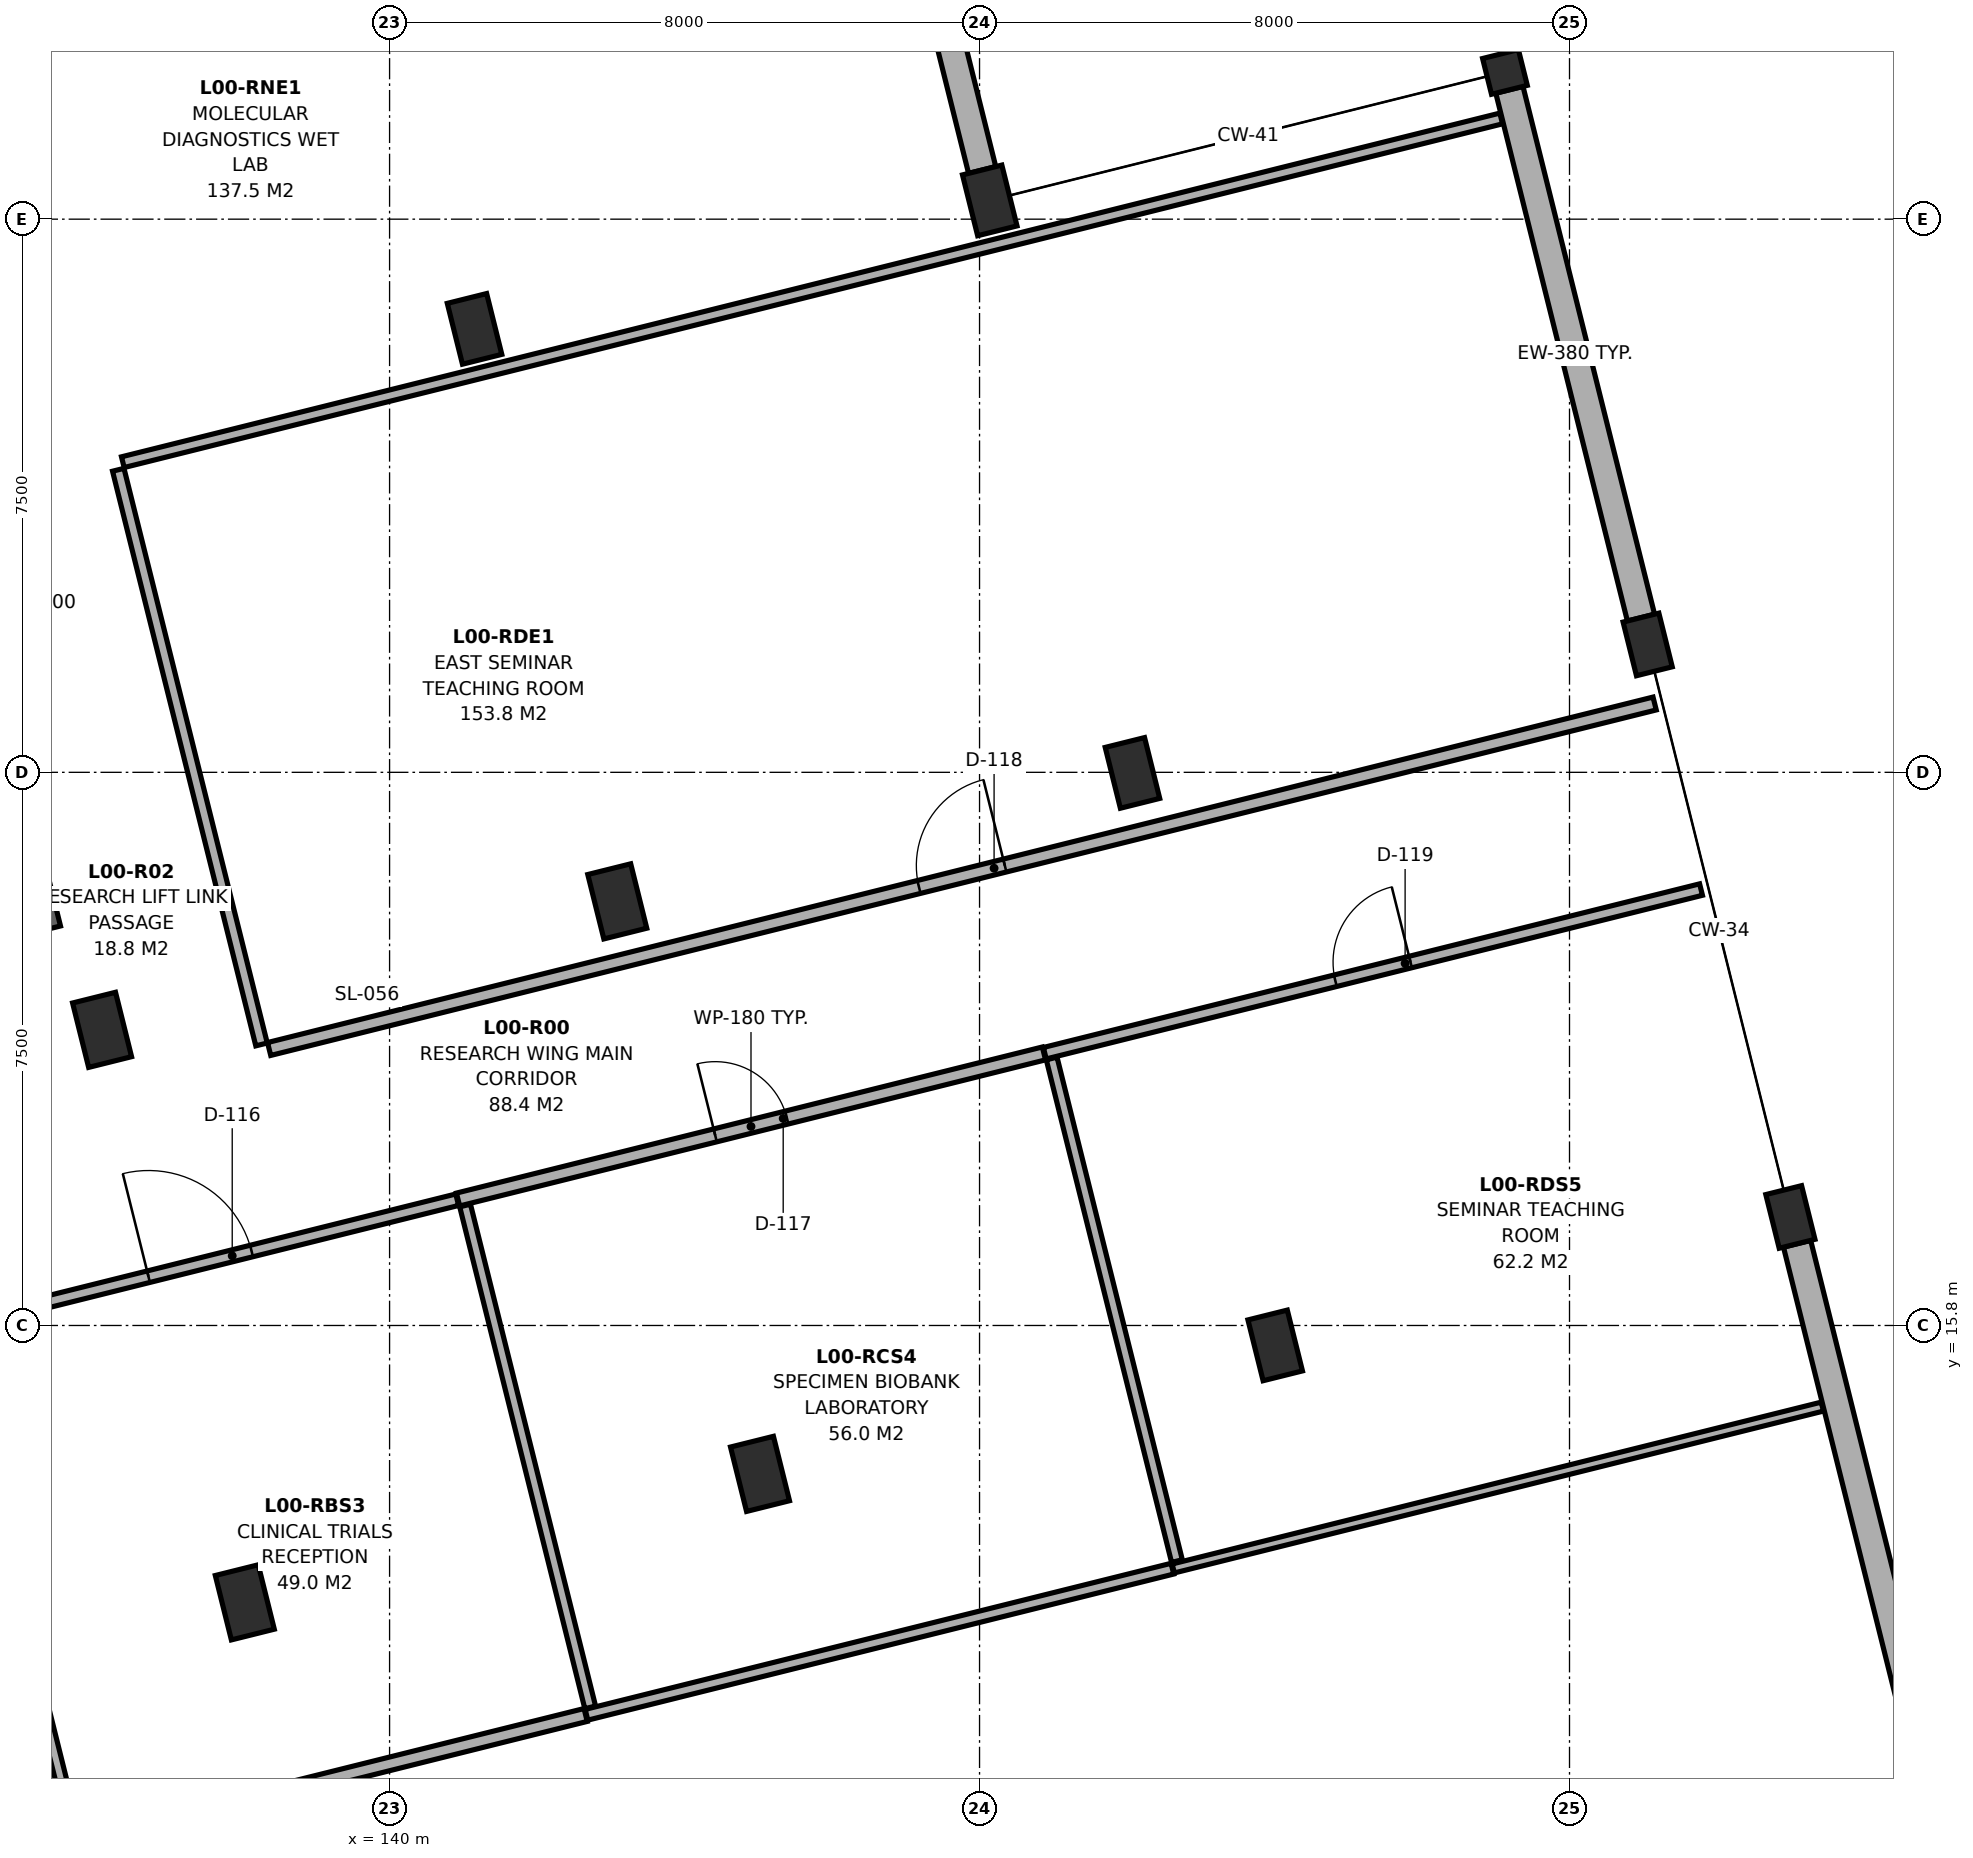
"""IFC4 building model, lengths in metres.
Left out: names, types, materials, properties, quantities, classifications, styles, units other than length and angle.
Written with IfcOpenShell. Run it as: python <this file> out.ifc"""

import sys

from ifc_helpers import new_model, si_unit, direction, frame, frame_2d, origin, origin_2d, place, context, subcontext, project, spatial, rectangle, extrude, element, fill, save


model = new_model("IFC4")
c1 = context("Model", 3, precision=1e-05, world=origin(), true_north=direction((0.0, 1.0)))
c2 = subcontext(c1, "Body", "Model", "MODEL_VIEW")
j1 = project(units=[si_unit("LENGTHUNIT", "METRE"), si_unit("PLANEANGLEUNIT", "RADIAN")], contexts=[c1])
p1 = place(None, origin())
s1 = spatial("IfcSite", under=j1, at=p1, CompositionType="ELEMENT")
p2 = place(p1, origin())
s2 = spatial("IfcBuilding", under=s1, at=p2, CompositionType="ELEMENT")
p3 = place(p2, origin())
s3 = spatial("IfcBuildingStorey", under=s2, at=p3, CompositionType="ELEMENT", Elevation=0.0)
for number, where, z_axis, x_axis in (
    (1, (138.037, 12.046, 0.0), (0.0, 0.0, 1.0), (0.97, 0.242, 0.0)),
    (2, (136.102, 19.808, 0.0), (0.0, 0.0, 1.0), (0.97, 0.242, 0.0)),
    (3, (145.023, 13.788, 0.0), (0.0, 0.0, 1.0), (0.97, 0.242, 0.0)),
    (4, (143.088, 21.55, 0.0), (0.0, 0.0, 1.0), (0.97, 0.242, 0.0)),
):
    element("IfcColumn", number, at=place(p3, frame(where, z_axis=z_axis, x_axis=x_axis)), inside=s3, PredefinedType="COLUMN", context=c2, shape_type="SweptSolid", body=[
        extrude(rectangle(XDim=0.6, YDim=0.9, at=origin_2d()), origin(), (0.0, 0.0, 1.0), 4.7),
    ])
for number, where, z_axis, x_axis in (
    (5, (141.152, 29.312, 0.0), (0.0, 0.0, 1.0), (0.97, 0.242, 0.0)),
    (6, (152.009, 15.53, 0.0), (0.0, 0.0, 1.0), (0.97, 0.242, 0.0)),
    (7, (150.074, 23.292, 0.0), (0.0, 0.0, 1.0), (0.97, 0.242, 0.0)),
    (8, (148.138, 31.054, 0.0), (0.0, 0.0, 1.0), (0.97, 0.242, 0.0)),
):
    element("IfcColumn", number, at=place(p3, frame(where, z_axis=z_axis, x_axis=x_axis)), inside=s3, PredefinedType="COLUMN", context=c2, shape_type="SweptSolid", body=[
        extrude(rectangle(XDim=0.55, YDim=0.85, at=origin_2d()), origin(), (0.0, 0.0, 1.0), 4.7),
    ])
for number, where, z_axis, x_axis in (
    (9, (158.995, 17.271, 0.0), (0.0, 0.0, 1.0), (0.97, 0.242, 0.0)),
    (10, (157.06, 25.034, 0.0), (0.0, 0.0, 1.0), (0.97, 0.242, 0.0)),
):
    element("IfcColumn", number, at=place(p3, frame(where, z_axis=z_axis, x_axis=x_axis)), inside=s3, PredefinedType="COLUMN", context=c2, shape_type="SweptSolid", body=[
        extrude(rectangle(XDim=0.5, YDim=0.75, at=origin_2d()), origin(), (0.0, 0.0, 1.0), 4.7),
    ])
p4 = place(p3, frame((155.125, 32.796, 0.0), z_axis=(0.0, 0.0, 1.0), x_axis=(0.970295726276, 0.2419218956, 0.0)))
e11 = element("IfcColumn", 11, at=p4, inside=s3, PredefinedType="COLUMN", context=c2, shape_type="SweptSolid", body=[
    extrude(rectangle(XDim=0.5, YDim=0.5, at=origin_2d()), origin(), (0.0, 0.0, 1.0), 6.096),
])
p5 = place(p3, frame((155.185, 32.554, 0.0), z_axis=(0.0, 0.0, 1.0), x_axis=(0.241920240952, -0.970296138825, 0.0)))
e12 = element("IfcWall", 12, at=p5, inside=s3, PredefinedType="SOLIDWALL", context=c2, shape_type="SweptSolid", body=[
    extrude(rectangle(XDim=7.375, YDim=0.38, at=frame_2d((3.688, 0.0))), origin(), (0.0, 0.0, 1.0), 3.985),
])
p6 = place(p3, frame((159.086, 16.908, 0.0), z_axis=(0.0, 0.0, 1.0), x_axis=(0.241917549853, -0.970296809782, 0.0)))
e13 = element("IfcWall", 13, at=p6, inside=s3, PredefinedType="SOLIDWALL", context=c2, shape_type="SweptSolid", body=[
    extrude(rectangle(XDim=7.25, YDim=0.38, at=frame_2d((3.625, 0.0))), origin(), (0.0, 0.0, 1.0), 3.985),
])
p7 = place(p3, frame((146.294, 38.453, 0.0), z_axis=(0.0, 0.0, 1.0), x_axis=(0.241937193493, -0.970291911955, 0.0)))
e14 = element("IfcWall", 14, at=p7, inside=s3, PredefinedType="SOLIDWALL", context=c2, shape_type="SweptSolid", body=[
    extrude(rectangle(XDim=7.2, YDim=0.38, at=frame_2d((3.6, 0.0))), origin(), (0.0, 0.0, 1.0), 3.985),
])
p8 = place(p3, frame((135.402, 21.183, 0.0), z_axis=(0.0, 0.0, 1.0), x_axis=(-0.241921647353, 0.970295788171, 0.0)))
e15 = element("IfcWall", 15, at=p8, inside=s3, PredefinedType="SHEAR", context=c2, shape_type="SweptSolid", body=[
    extrude(rectangle(XDim=2.994, YDim=0.28, at=frame_2d((1.497, 0.0))), origin(), (0.0, 0.0, 1.0), 4.7),
])
p9 = place(p3, frame((133.942, 15.766, 0.0), z_axis=(0.0, 0.0, 1.0), x_axis=(0.970292162734, 0.241936187739, 0.0)))
e16 = element("IfcWall", 16, at=p9, inside=s3, PredefinedType="PARTITIONING", context=c2, shape_type="SweptSolid", body=[
    extrude(rectangle(XDim=7.188, YDim=0.16, at=frame_2d((3.594, 0.0))), origin(), (0.0, 0.0, 1.0), 3.885),
])
p10 = place(p9, frame((2.874, 0.0, 0.0)))
e17 = element("IfcOpeningElement", 17, at=p10, cuts=e16, PredefinedType="OPENING", context=c2, shape_type="SweptSolid", body=[
    extrude(rectangle(XDim=1.44, YDim=2.32, at=frame_2d((0.72, 1.16))), frame((0.0, 0.092, 0.0), z_axis=(0.0, -1.0, 0.0), x_axis=(1.0, 0.0, 0.0)), (0.0, 0.0, 1.0), 0.184),
])
p11 = place(p3, frame((140.928, 17.508, 0.0), z_axis=(0.0, 0.0, 1.0), x_axis=(0.970293149657, 0.241932229621, 0.0)))
e18 = element("IfcWall", 18, at=p11, inside=s3, PredefinedType="PARTITIONING", context=c2, shape_type="SweptSolid", body=[
    extrude(rectangle(XDim=8.188, YDim=0.18, at=frame_2d((4.094, 0.0))), origin(), (0.0, 0.0, 1.0), 3.885),
])
p12 = place(p11, frame((3.594, 0.0, 0.0)))
e19 = element("IfcOpeningElement", 19, at=p12, cuts=e18, PredefinedType="OPENING", context=c2, shape_type="SweptSolid", body=[
    extrude(rectangle(XDim=1.0, YDim=2.15, at=frame_2d((0.5, 1.075))), frame((0.0, 0.102, 0.0), z_axis=(0.0, -1.0, 0.0), x_axis=(1.0, 0.0, 0.0)), (0.0, 0.0, 1.0), 0.204),
])
p13 = place(p3, frame((148.885, 19.491, 0.0), z_axis=(0.0, 0.0, 1.0), x_axis=(0.970294203895, 0.241928001454, 0.0)))
e20 = element("IfcWall", 20, at=p13, inside=s3, PredefinedType="PARTITIONING", context=c2, shape_type="SweptSolid", body=[
    extrude(rectangle(XDim=9.171, YDim=0.16, at=frame_2d((4.585, 0.0))), origin(), (0.0, 0.0, 1.0), 3.885),
])
p14 = place(p13, frame((4.061, 0.0, 0.0)))
e21 = element("IfcOpeningElement", 21, at=p14, cuts=e20, PredefinedType="OPENING", context=c2, shape_type="SweptSolid", body=[
    extrude(rectangle(XDim=1.05, YDim=2.15, at=frame_2d((0.525, 1.075))), frame((0.0, 0.092, 0.0), z_axis=(0.0, -1.0, 0.0), x_axis=(1.0, 0.0, 0.0)), (0.0, 0.0, 1.0), 0.184),
])
p15 = place(p3, frame((138.367, 19.549, 0.0), z_axis=(0.0, 0.0, 1.0), x_axis=(0.970295834183, 0.241921462809, 0.0)))
e22 = element("IfcWall", 22, at=p15, inside=s3, PredefinedType="PARTITIONING", context=c2, shape_type="SweptSolid", body=[
    extrude(rectangle(XDim=19.363, YDim=0.18, at=frame_2d((9.682, 0.0))), origin(), (0.0, 0.0, 1.0), 3.885),
])
p16 = place(p15, frame((9.082, 0.0, 0.0)))
e23 = element("IfcOpeningElement", 23, at=p16, cuts=e22, PredefinedType="OPENING", context=c2, shape_type="SweptSolid", body=[
    extrude(rectangle(XDim=1.2, YDim=2.15, at=frame_2d((0.6, 1.075))), frame((0.0, 0.102, 0.0), z_axis=(0.0, -1.0, 0.0), x_axis=(1.0, 0.0, 0.0)), (0.0, 0.0, 1.0), 0.204),
])
p17 = place(p3, frame((135.737, 8.87, 0.0), z_axis=(0.0, 0.0, 1.0), x_axis=(-0.241939357675, 0.970291372325, 0.0)))
e24 = element("IfcWall", 24, at=p17, inside=s3, PredefinedType="PARTITIONING", context=c2, shape_type="SweptSolid", body=[
    extrude(rectangle(XDim=7.033, YDim=0.15, at=frame_2d((3.517, 0.0))), origin(), (0.0, 0.0, 1.0), 3.985),
])
p18 = place(p3, frame((138.479, 9.477, 0.0), z_axis=(0.0, 0.0, 1.0), x_axis=(0.970295647322, 0.241922212266, 0.0)))
e25 = element("IfcWall", 25, at=p18, inside=s3, PredefinedType="PARTITIONING", context=c2, shape_type="SweptSolid", body=[
    extrude(rectangle(XDim=4.308, YDim=0.18, at=frame_2d((2.154, 0.0))), origin(), (0.0, 0.0, 1.0), 3.885),
])
p19 = place(p3, frame((142.72, 10.622, 0.0), z_axis=(0.0, 0.0, 1.0), x_axis=(-0.241913043167, 0.970297933393, 0.0)))
e26 = element("IfcWall", 26, at=p19, inside=s3, PredefinedType="PARTITIONING", context=c2, shape_type="SweptSolid", body=[
    extrude(rectangle(XDim=7.013, YDim=0.15, at=frame_2d((3.506, 0.0))), origin(), (0.0, 0.0, 1.0), 3.985),
])
p20 = place(p3, frame((142.67, 10.522, 0.0), z_axis=(0.0, 0.0, 1.0), x_axis=(0.970298403727, 0.241911156677, 0.0)))
e27 = element("IfcWall", 27, at=p20, inside=s3, PredefinedType="PARTITIONING", context=c2, shape_type="SweptSolid", body=[
    extrude(rectangle(XDim=8.188, YDim=0.15, at=frame_2d((4.094, 0.0))), origin(), (0.0, 0.0, 1.0), 3.885),
])
p21 = place(p3, frame((150.677, 12.605, 0.0), z_axis=(0.0, 0.0, 1.0), x_axis=(-0.241913935588, 0.970297710895, 0.0)))
e28 = element("IfcWall", 28, at=p21, inside=s3, PredefinedType="PARTITIONING", context=c2, shape_type="SweptSolid", body=[
    extrude(rectangle(XDim=7.023, YDim=0.15, at=frame_2d((3.511, 0.0))), origin(), (0.0, 0.0, 1.0), 3.985),
])
p22 = place(p3, frame((150.627, 12.505, 0.0), z_axis=(0.0, 0.0, 1.0), x_axis=(0.970292717865, 0.241933961357, 0.0)))
e29 = element("IfcWall", 29, at=p22, inside=s3, PredefinedType="PARTITIONING", context=c2, shape_type="SweptSolid", body=[
    extrude(rectangle(XDim=9.071, YDim=0.125, at=frame_2d((4.536, 0.0))), origin(), (0.0, 0.0, 1.0), 3.885),
])
p23 = place(p3, frame((136.383, 27.505, 0.0), z_axis=(0.0, 0.0, 1.0), x_axis=(0.970295884672, 0.241921260307, 0.0)))
e30 = element("IfcWall", 30, at=p23, inside=s3, PredefinedType="PARTITIONING", context=c2, shape_type="SweptSolid", body=[
    extrude(rectangle(XDim=19.263, YDim=0.15, at=frame_2d((9.632, 0.0))), origin(), (0.0, 0.0, 1.0), 3.885),
])
p24 = place(p3, frame((138.264, 19.611, 0.0), z_axis=(0.0, 0.0, 1.0), x_axis=(-0.241920353256, 0.970296110824, 0.0)))
e31 = element("IfcWall", 31, at=p24, inside=s3, PredefinedType="PARTITIONING", context=c2, shape_type="SweptSolid", body=[
    extrude(rectangle(XDim=8.03, YDim=0.16, at=frame_2d((4.015, 0.0))), origin(), (0.0, 0.0, 1.0), 3.985),
])
p25 = place(p10, origin())
e32 = element("IfcDoor", 32, at=p25, inside=s3, OperationType="SINGLE_SWING_LEFT", PredefinedType="DOOR", context=c2, shape_type="SweptSolid", body=[
    extrude(rectangle(XDim=1.44, YDim=2.32, at=frame_2d((0.72, 1.16))), frame((0.0, 0.025, 0.0), z_axis=(0.0, -1.0, 0.0), x_axis=(1.0, 0.0, 0.0)), (0.0, 0.0, 1.0), 0.05),
])
fill(e17, e32)
p26 = place(p12, origin())
e33 = element("IfcDoor", 33, at=p26, inside=s3, OperationType="SINGLE_SWING_LEFT", PredefinedType="DOOR", context=c2, shape_type="SweptSolid", body=[
    extrude(rectangle(XDim=1.0, YDim=2.15, at=frame_2d((0.5, 1.075))), frame((0.0, 0.025, 0.0), z_axis=(0.0, -1.0, 0.0), x_axis=(1.0, 0.0, 0.0)), (0.0, 0.0, 1.0), 0.05),
])
fill(e19, e33)
p27 = place(p14, origin())
e34 = element("IfcDoor", 34, at=p27, inside=s3, OperationType="SINGLE_SWING_RIGHT", PredefinedType="DOOR", context=c2, shape_type="SweptSolid", body=[
    extrude(rectangle(XDim=1.05, YDim=2.15, at=frame_2d((0.525, 1.075))), frame((0.0, 0.025, 0.0), z_axis=(0.0, -1.0, 0.0), x_axis=(1.0, 0.0, 0.0)), (0.0, 0.0, 1.0), 0.05),
])
fill(e21, e34)
p28 = place(p16, origin())
e35 = element("IfcDoor", 35, at=p28, inside=s3, OperationType="SINGLE_SWING_RIGHT", PredefinedType="DOOR", context=c2, shape_type="SweptSolid", body=[
    extrude(rectangle(XDim=1.2, YDim=2.15, at=frame_2d((0.6, 1.075))), frame((0.0, 0.025, 0.0), z_axis=(0.0, -1.0, 0.0), x_axis=(1.0, 0.0, 0.0)), (0.0, 0.0, 1.0), 0.05),
])
fill(e23, e35)
save(model, sys.argv[1])
